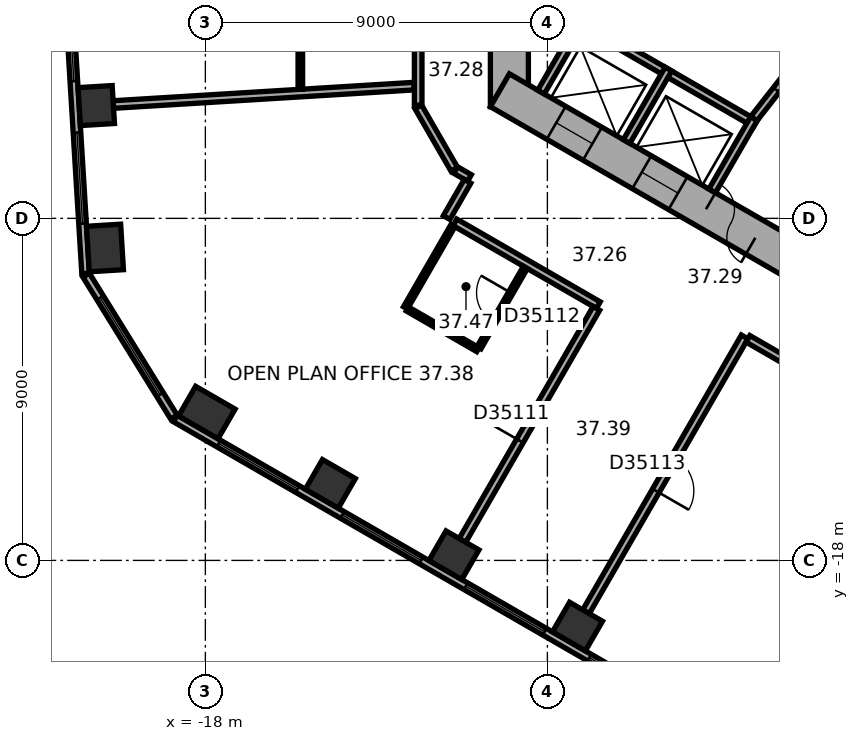
"""IFC4 building model, lengths in metres.
Left out: names, types, materials, properties, quantities, classifications, styles, units other than length and angle.
Written with IfcOpenShell. Run it as: python <this file> out.ifc"""

import sys

from ifc_helpers import new_model, si_unit, direction, frame, frame_2d, origin, origin_2d, place, context, subcontext, project, spatial, rectangle, extrude, element, fill, save


model = new_model("IFC4")
c1 = context("Model", 3, precision=1e-05, world=origin(), true_north=direction((0.0, 1.0)))
c2 = subcontext(c1, "Body", "Model", "MODEL_VIEW")
j1 = project(units=[si_unit("LENGTHUNIT", "METRE"), si_unit("PLANEANGLEUNIT", "RADIAN")], contexts=[c1])
p1 = place(None, origin())
s1 = spatial("IfcSite", under=j1, at=p1, CompositionType="ELEMENT")
p2 = place(p1, origin())
s2 = spatial("IfcBuilding", under=s1, at=p2, CompositionType="ELEMENT")
p3 = place(p2, frame((0.0, 0.0, 154.0)))
s3 = spatial("IfcBuildingStorey", under=s2, at=p3, CompositionType="ELEMENT", Elevation=154.0)
p4 = place(p3, frame((-20.871, -6.032, 0.0), z_axis=(0.0, 0.0, 1.0), x_axis=(0.061048539535, -0.998134798422, 0.0)))
e1 = element("IfcColumn", 1, at=p4, inside=s3, PredefinedType="COLUMN", context=c2, shape_type="SweptSolid", body=[
    extrude(rectangle(XDim=1.0, YDim=0.9, at=origin_2d()), origin(), (0.0, 0.0, 1.0), 3.7),
])
for number, where, z_axis, x_axis in (
    (2, (-20.642, -9.779, 0.0), (0.0, 0.0, 1.0), (0.061, -0.998, 0.0)),
    (3, (-17.962, -14.109, 0.0), (0.0, 0.0, 1.0), (0.866, -0.5, 0.0)),
):
    element("IfcColumn", number, at=place(p3, frame(where, z_axis=z_axis, x_axis=x_axis)), inside=s3, PredefinedType="COLUMN", context=c2, shape_type="SweptSolid", body=[
        extrude(rectangle(XDim=1.2, YDim=0.9, at=origin_2d()), origin(), (0.0, 0.0, 1.0), 3.7),
    ])
for number, where, z_axis, x_axis in (
    (4, (-14.711, -15.986, 0.0), (0.0, 0.0, 1.0), (0.866, -0.5, 0.0)),
    (5, (-11.46, -17.863, 0.0), (0.0, 0.0, 1.0), (0.866, -0.5, 0.0)),
    (6, (-8.208, -19.74, 0.0), (0.0, 0.0, 1.0), (0.866, -0.5, 0.0)),
):
    element("IfcColumn", number, at=place(p3, frame(where, z_axis=z_axis, x_axis=x_axis)), inside=s3, PredefinedType="COLUMN", context=c2, shape_type="SweptSolid", body=[
        extrude(rectangle(XDim=1.0, YDim=0.9, at=origin_2d()), origin(), (0.0, 0.0, 1.0), 3.7),
    ])
p5 = place(p3, frame((-10.0, 6.062, 0.0), z_axis=(0.0, 0.0, 1.0), x_axis=(0.0, -1.0, 0.0)))
e7 = element("IfcWall", 7, at=p5, inside=s3, PredefinedType="SHEAR", context=c2, shape_type="SweptSolid", body=[
    extrude(rectangle(XDim=12.125, YDim=1.0, at=frame_2d((6.062, 0.0))), origin(), (0.0, 0.0, 1.0), 3.7),
])
p6 = place(p5, frame((5.212, 0.0, 0.0)))
e8 = element("IfcOpeningElement", 8, at=p6, cuts=e7, PredefinedType="OPENING", context=c2, shape_type="SweptSolid", body=[
    extrude(rectangle(XDim=1.1, YDim=2.1, at=frame_2d((0.55, 1.05))), frame((0.0, 0.51, 0.0), z_axis=(0.0, -1.0, 0.0), x_axis=(1.0, 0.0, 0.0)), (0.0, 0.0, 1.0), 1.02),
])
p7 = place(p5, frame((7.812, 0.0, 0.0)))
e9 = element("IfcOpeningElement", 9, at=p7, cuts=e7, PredefinedType="OPENING", context=c2, shape_type="SweptSolid", body=[
    extrude(rectangle(XDim=1.1, YDim=2.1, at=frame_2d((0.55, 1.05))), frame((0.0, 0.51, 0.0), z_axis=(0.0, -1.0, 0.0), x_axis=(1.0, 0.0, 0.0)), (0.0, 0.0, 1.0), 1.02),
])
p8 = place(p3, frame((-10.25, -5.629, 0.0), z_axis=(0.0, 0.0, 1.0), x_axis=(0.866022616891, -0.50000482701, 0.0)))
e10 = element("IfcWall", 10, at=p8, inside=s3, PredefinedType="SHEAR", context=c2, shape_type="SweptSolid", body=[
    extrude(rectangle(XDim=12.125, YDim=1.0, at=frame_2d((6.062, 0.0))), origin(), (0.0, 0.0, 1.0), 3.7),
])
p9 = place(p8, frame((6.262, 0.0, 0.0)))
e11 = element("IfcOpeningElement", 11, at=p9, cuts=e10, PredefinedType="OPENING", context=c2, shape_type="SweptSolid", body=[
    extrude(rectangle(XDim=1.5, YDim=2.1, at=frame_2d((0.75, 1.05))), frame((0.0, 0.51, 0.0), z_axis=(0.0, -1.0, 0.0), x_axis=(1.0, 0.0, 0.0)), (0.0, 0.0, 1.0), 1.02),
])
p10 = place(p8, frame((1.712, 0.0, 0.0)))
e12 = element("IfcOpeningElement", 12, at=p10, cuts=e10, PredefinedType="OPENING", context=c2, shape_type="SweptSolid", body=[
    extrude(rectangle(XDim=1.1, YDim=2.1, at=frame_2d((0.55, 1.05))), frame((0.0, 0.51, 0.0), z_axis=(0.0, -1.0, 0.0), x_axis=(1.0, 0.0, 0.0)), (0.0, 0.0, 1.0), 1.02),
])
p11 = place(p8, frame((4.312, 0.0, 0.0)))
e13 = element("IfcOpeningElement", 13, at=p11, cuts=e10, PredefinedType="OPENING", context=c2, shape_type="SweptSolid", body=[
    extrude(rectangle(XDim=1.1, YDim=2.1, at=frame_2d((0.55, 1.05))), frame((0.0, 0.51, 0.0), z_axis=(0.0, -1.0, 0.0), x_axis=(1.0, 0.0, 0.0)), (0.0, 0.0, 1.0), 1.02),
])
p12 = place(p3, frame((-22.375, 9.557, 0.0), z_axis=(0.0, 0.0, 1.0), x_axis=(0.061036015339, -0.998135564356, 0.0)))
e14 = element("IfcWall", 14, at=p12, inside=s3, PredefinedType="STANDARD", context=c2, shape_type="SweptSolid", body=[
    extrude(rectangle(XDim=20.044, YDim=0.2, at=frame_2d((10.022, 0.0))), origin(), (0.0, 0.0, 1.0), 3.7),
])
p13 = place(p12, frame((1.313, 0.0, 0.9)))
e15 = element("IfcOpeningElement", 15, at=p13, cuts=e14, PredefinedType="OPENING", context=c2, shape_type="SweptSolid", body=[
    extrude(rectangle(XDim=2.4, YDim=2.0, at=frame_2d((1.2, 1.0))), frame((0.0, 0.11, 0.0), z_axis=(0.0, -1.0, 0.0), x_axis=(1.0, 0.0, 0.0)), (0.0, 0.0, 1.0), 0.22),
])
p14 = place(p12, frame((5.067, 0.0, 0.9)))
e16 = element("IfcOpeningElement", 16, at=p14, cuts=e14, PredefinedType="OPENING", context=c2, shape_type="SweptSolid", body=[
    extrude(rectangle(XDim=2.4, YDim=2.0, at=frame_2d((1.2, 1.0))), frame((0.0, 0.11, 0.0), z_axis=(0.0, -1.0, 0.0), x_axis=(1.0, 0.0, 0.0)), (0.0, 0.0, 1.0), 0.22),
])
p15 = place(p12, frame((8.821, 0.0, 0.9)))
e17 = element("IfcOpeningElement", 17, at=p15, cuts=e14, PredefinedType="OPENING", context=c2, shape_type="SweptSolid", body=[
    extrude(rectangle(XDim=2.4, YDim=2.0, at=frame_2d((1.2, 1.0))), frame((0.0, 0.11, 0.0), z_axis=(0.0, -1.0, 0.0), x_axis=(1.0, 0.0, 0.0)), (0.0, 0.0, 1.0), 0.22),
])
p16 = place(p12, frame((12.575, 0.0, 0.9)))
e18 = element("IfcOpeningElement", 18, at=p16, cuts=e14, PredefinedType="OPENING", context=c2, shape_type="SweptSolid", body=[
    extrude(rectangle(XDim=2.4, YDim=2.0, at=frame_2d((1.2, 1.0))), frame((0.0, 0.11, 0.0), z_axis=(0.0, -1.0, 0.0), x_axis=(1.0, 0.0, 0.0)), (0.0, 0.0, 1.0), 0.22),
])
p17 = place(p12, frame((16.329, 0.0, 0.9)))
e19 = element("IfcOpeningElement", 19, at=p17, cuts=e14, PredefinedType="OPENING", context=c2, shape_type="SweptSolid", body=[
    extrude(rectangle(XDim=2.4, YDim=2.0, at=frame_2d((1.2, 1.0))), frame((0.0, 0.11, 0.0), z_axis=(0.0, -1.0, 0.0), x_axis=(1.0, 0.0, 0.0)), (0.0, 0.0, 1.0), 0.22),
])
p18 = place(p3, frame((-21.137, -10.496, 0.0), z_axis=(0.0, 0.0, 1.0), x_axis=(0.526178661629, -0.850374044786, 0.0)))
e20 = element("IfcWall", 20, at=p18, inside=s3, PredefinedType="STANDARD", context=c2, shape_type="SweptSolid", body=[
    extrude(rectangle(XDim=4.395, YDim=0.2, at=frame_2d((2.197, 0.0))), origin(), (0.0, 0.0, 1.0), 3.7),
])
p19 = place(p18, frame((0.698, 0.0, 0.9)))
e21 = element("IfcOpeningElement", 21, at=p19, cuts=e20, PredefinedType="OPENING", context=c2, shape_type="SweptSolid", body=[
    extrude(rectangle(XDim=3.0, YDim=2.0, at=frame_2d((1.5, 1.0))), frame((0.0, 0.11, 0.0), z_axis=(0.0, -1.0, 0.0), x_axis=(1.0, 0.0, 0.0)), (0.0, 0.0, 1.0), 0.22),
])
p20 = place(p3, frame((-18.789, -14.267, 0.0), z_axis=(0.0, 0.0, 1.0), x_axis=(0.866023315909, -0.500003616288, 0.0)))
e22 = element("IfcWall", 22, at=p20, inside=s3, PredefinedType="STANDARD", context=c2, shape_type="SweptSolid", body=[
    extrude(rectangle(XDim=20.044, YDim=0.2, at=frame_2d((10.022, 0.0))), origin(), (0.0, 0.0, 1.0), 3.7),
])
p21 = place(p20, frame((1.314, 0.0, 0.9)))
e23 = element("IfcOpeningElement", 23, at=p21, cuts=e22, PredefinedType="OPENING", context=c2, shape_type="SweptSolid", body=[
    extrude(rectangle(XDim=2.4, YDim=2.0, at=frame_2d((1.2, 1.0))), frame((0.0, 0.11, 0.0), z_axis=(0.0, -1.0, 0.0), x_axis=(1.0, 0.0, 0.0)), (0.0, 0.0, 1.0), 0.22),
])
p22 = place(p20, frame((5.069, 0.0, 0.9)))
e24 = element("IfcOpeningElement", 24, at=p22, cuts=e22, PredefinedType="OPENING", context=c2, shape_type="SweptSolid", body=[
    extrude(rectangle(XDim=2.4, YDim=2.0, at=frame_2d((1.2, 1.0))), frame((0.0, 0.11, 0.0), z_axis=(0.0, -1.0, 0.0), x_axis=(1.0, 0.0, 0.0)), (0.0, 0.0, 1.0), 0.22),
])
p23 = place(p20, frame((8.823, 0.0, 0.9)))
e25 = element("IfcOpeningElement", 25, at=p23, cuts=e22, PredefinedType="OPENING", context=c2, shape_type="SweptSolid", body=[
    extrude(rectangle(XDim=2.4, YDim=2.0, at=frame_2d((1.2, 1.0))), frame((0.0, 0.11, 0.0), z_axis=(0.0, -1.0, 0.0), x_axis=(1.0, 0.0, 0.0)), (0.0, 0.0, 1.0), 0.22),
])
p24 = place(p20, frame((12.577, 0.0, 0.9)))
e26 = element("IfcOpeningElement", 26, at=p24, cuts=e22, PredefinedType="OPENING", context=c2, shape_type="SweptSolid", body=[
    extrude(rectangle(XDim=2.4, YDim=2.0, at=frame_2d((1.2, 1.0))), frame((0.0, 0.11, 0.0), z_axis=(0.0, -1.0, 0.0), x_axis=(1.0, 0.0, 0.0)), (0.0, 0.0, 1.0), 0.22),
])
p25 = place(p20, frame((16.331, 0.0, 0.9)))
e27 = element("IfcOpeningElement", 27, at=p25, cuts=e22, PredefinedType="OPENING", context=c2, shape_type="SweptSolid", body=[
    extrude(rectangle(XDim=2.4, YDim=2.0, at=frame_2d((1.2, 1.0))), frame((0.0, 0.11, 0.0), z_axis=(0.0, -1.0, 0.0), x_axis=(1.0, 0.0, 0.0)), (0.0, 0.0, 1.0), 0.22),
])
p26 = place(p3, frame((-8.203, -3.809, 0.0), z_axis=(0.0, 0.0, 1.0), x_axis=(0.866028230842, -0.499995103361, 0.0)))
e28 = element("IfcWall", 28, at=p26, inside=s3, PredefinedType="PARTITIONING", context=c2, shape_type="SweptSolid", body=[
    extrude(rectangle(XDim=5.4, YDim=0.2, at=frame_2d((2.7, 0.0))), origin(), (0.0, 0.0, 1.0), 3.42),
])
for number, where, z_axis, x_axis in (
    (29, (-8.067, -3.772, 0.0), (0.0, 0.0, 1.0), (-0.5, -0.866, 0.0)),
    (30, (-5.815, -5.072, 0.0), (0.0, 0.0, 1.0), (-0.5, -0.866, 0.0)),
):
    element("IfcWall", number, at=place(p3, frame(where, z_axis=z_axis, x_axis=x_axis)), inside=s3, PredefinedType="PARTITIONING", context=c2, shape_type="SweptSolid", body=[
        extrude(rectangle(XDim=2.2, YDim=0.2, at=frame_2d((1.1, 0.0))), origin(), (0.0, 0.0, 1.0), 3.42),
    ])
p27 = place(p3, frame((-3.563, -6.372, 0.0), z_axis=(0.0, 0.0, 1.0), x_axis=(-0.499994660107, -0.866028486751, 0.0)))
e31 = element("IfcWall", 31, at=p27, inside=s3, PredefinedType="PARTITIONING", context=c2, shape_type="SweptSolid", body=[
    extrude(rectangle(XDim=2.2, YDim=0.2, at=frame_2d((1.1, 0.0))), origin(), (0.0, 0.0, 1.0), 3.42),
])
p28 = place(p3, frame((-1.712, -4.008, 0.0), z_axis=(0.0, 0.0, 1.0), x_axis=(-0.616549420702, -0.787316208287, 0.0)))
e32 = element("IfcWall", 32, at=p28, inside=s3, PredefinedType="PARTITIONING", context=c2, shape_type="SweptSolid", body=[
    extrude(rectangle(XDim=3.002, YDim=0.2, at=frame_2d((1.501, 0.0))), origin(), (0.0, 0.0, 1.0), 3.42),
])
p29 = place(p28, frame((1.15, 0.0, 0.0)))
e33 = element("IfcOpeningElement", 33, at=p29, cuts=e32, PredefinedType="OPENING", context=c2, shape_type="SweptSolid", body=[
    extrude(rectangle(XDim=0.9, YDim=2.1, at=frame_2d((0.45, 1.05))), frame((0.0, 0.11, 0.0), z_axis=(0.0, -1.0, 0.0), x_axis=(1.0, 0.0, 0.0)), (0.0, 0.0, 1.0), 0.22),
])
p30 = place(p3, frame((-20.421, -6.005, 0.0), z_axis=(0.0, 0.0, 1.0), x_axis=(0.998134865741, 0.061047438866, 0.0)))
e34 = element("IfcWall", 34, at=p30, inside=s3, PredefinedType="PARTITIONING", context=c2, shape_type="SweptSolid", body=[
    extrude(rectangle(XDim=7.927, YDim=0.2, at=frame_2d((3.963, 0.0))), origin(), (0.0, 0.0, 1.0), 2.87),
])
p31 = place(p3, frame((-15.501, 5.479, 0.0), z_axis=(0.0, 0.0, 1.0), x_axis=(0.0, -1.0, 0.0)))
e35 = element("IfcWall", 35, at=p31, inside=s3, PredefinedType="PARTITIONING", context=c2, shape_type="SweptSolid", body=[
    extrude(rectangle(XDim=11.083, YDim=0.12, at=frame_2d((5.542, 0.0))), origin(), (0.0, 0.0, 1.0), 3.42),
])
p32 = place(p31, frame((0.55, 0.0, 0.0)))
e36 = element("IfcOpeningElement", 36, at=p32, cuts=e35, PredefinedType="OPENING", context=c2, shape_type="SweptSolid", body=[
    extrude(rectangle(XDim=1.0, YDim=2.1, at=frame_2d((0.5, 1.05))), frame((0.0, 0.07, 0.0), z_axis=(0.0, -1.0, 0.0), x_axis=(1.0, 0.0, 0.0)), (0.0, 0.0, 1.0), 0.14),
])
p33 = place(p31, frame((3.636, 0.0, 0.0)))
e37 = element("IfcOpeningElement", 37, at=p33, cuts=e35, PredefinedType="OPENING", context=c2, shape_type="SweptSolid", body=[
    extrude(rectangle(XDim=0.9, YDim=2.1, at=frame_2d((0.45, 1.05))), frame((0.0, 0.07, 0.0), z_axis=(0.0, -1.0, 0.0), x_axis=(1.0, 0.0, 0.0)), (0.0, 0.0, 1.0), 0.14),
])
p34 = place(p31, frame((8.127, 0.0, 0.0)))
e38 = element("IfcOpeningElement", 38, at=p34, cuts=e35, PredefinedType="OPENING", context=c2, shape_type="SweptSolid", body=[
    extrude(rectangle(XDim=0.9, YDim=2.1, at=frame_2d((0.45, 1.05))), frame((0.0, 0.07, 0.0), z_axis=(0.0, -1.0, 0.0), x_axis=(1.0, 0.0, 0.0)), (0.0, 0.0, 1.0), 0.14),
])
p35 = place(p3, frame((-12.735, -11.355, 0.0), z_axis=(0.0, 0.0, 1.0), x_axis=(0.500004234368, 0.866022959057, 0.0)))
e39 = element("IfcWall", 39, at=p35, inside=s3, PredefinedType="PARTITIONING", context=c2, shape_type="SweptSolid", body=[
    extrude(rectangle(XDim=2.5, YDim=0.12, at=frame_2d((1.25, 0.0))), origin(), (0.0, 0.0, 1.0), 3.42),
])
p36 = place(p3, frame((-12.4, -6.062, 0.0), z_axis=(0.0, 0.0, 1.0), x_axis=(0.500022797313, -0.86601224135, 0.0)))
e40 = element("IfcWall", 40, at=p36, inside=s3, PredefinedType="PARTITIONING", context=c2, shape_type="SweptSolid", body=[
    extrude(rectangle(XDim=1.9, YDim=0.2, at=frame_2d((0.95, 0.0))), origin(), (0.0, 0.0, 1.0), 3.42),
])
p37 = place(p3, frame((-12.4, -4.201, 0.0), z_axis=(0.0, 0.0, 1.0), x_axis=(0.0, -1.0, 0.0)))
e41 = element("IfcWall", 41, at=p37, inside=s3, PredefinedType="PARTITIONING", context=c2, shape_type="SweptSolid", body=[
    extrude(rectangle(XDim=1.821, YDim=0.2, at=frame_2d((0.911, 0.0))), origin(), (0.0, 0.0, 1.0), 3.42),
])
p38 = place(p3, frame((-11.435, -9.103, 0.0), z_axis=(0.0, 0.0, 1.0), x_axis=(0.866007399799, -0.500031182522, 0.0)))
e42 = element("IfcWall", 42, at=p38, inside=s3, PredefinedType="PARTITIONING", context=c2, shape_type="SweptSolid", body=[
    extrude(rectangle(XDim=4.358, YDim=0.2, at=frame_2d((2.179, 0.0))), origin(), (0.0, 0.0, 1.0), 3.42),
])
p39 = place(p3, frame((-11.415, -7.728, 0.0), z_axis=(0.0, 0.0, 1.0), x_axis=(0.865915281873, -0.500190688257, 0.0)))
e43 = element("IfcWall", 43, at=p39, inside=s3, PredefinedType="PARTITIONING", context=c2, shape_type="SweptSolid", body=[
    extrude(rectangle(XDim=0.421, YDim=0.2, at=frame_2d((0.21, 0.0))), origin(), (0.0, 0.0, 1.0), 3.42),
])
p40 = place(p3, frame((-11.235, -17.474, 0.0), z_axis=(0.0, 0.0, 1.0), x_axis=(0.500009260695, 0.866020057054, 0.0)))
e44 = element("IfcWall", 44, at=p40, inside=s3, PredefinedType="PARTITIONING", context=c2, shape_type="SweptSolid", body=[
    extrude(rectangle(XDim=7.049, YDim=0.2, at=frame_2d((3.524, 0.0))), origin(), (0.0, 0.0, 1.0), 2.87),
])
p41 = place(p40, frame((3.024, 0.0, 0.0)))
e45 = element("IfcOpeningElement", 45, at=p41, cuts=e44, PredefinedType="OPENING", context=c2, shape_type="SweptSolid", body=[
    extrude(rectangle(XDim=1.0, YDim=2.1, at=frame_2d((0.5, 1.05))), frame((0.0, 0.11, 0.0), z_axis=(0.0, -1.0, 0.0), x_axis=(1.0, 0.0, 0.0)), (0.0, 0.0, 1.0), 0.22),
])
p42 = place(p3, frame((-11.101, -8.025, 0.0), z_axis=(0.0, 0.0, 1.0), x_axis=(-0.500074377092, -0.865982457891, 0.0)))
e46 = element("IfcWall", 46, at=p42, inside=s3, PredefinedType="PARTITIONING", context=c2, shape_type="SweptSolid", body=[
    extrude(rectangle(XDim=1.101, YDim=0.2, at=frame_2d((0.55, 0.0))), origin(), (0.0, 0.0, 1.0), 3.42),
])
p43 = place(p3, frame((-10.829, -12.455, 0.0), z_axis=(0.0, 0.0, 1.0), x_axis=(-0.86600889856, 0.500028586798, 0.0)))
e47 = element("IfcWall", 47, at=p43, inside=s3, PredefinedType="PARTITIONING", context=c2, shape_type="SweptSolid", body=[
    extrude(rectangle(XDim=2.14, YDim=0.12, at=frame_2d((1.07, 0.0))), origin(), (0.0, 0.0, 1.0), 3.42),
])
p44 = place(p3, frame((-9.579, -10.29, 0.0), z_axis=(0.0, 0.0, 1.0), x_axis=(-0.499959183527, -0.866048967903, 0.0)))
e48 = element("IfcWall", 48, at=p44, inside=s3, PredefinedType="PARTITIONING", context=c2, shape_type="SweptSolid", body=[
    extrude(rectangle(XDim=2.44, YDim=0.12, at=frame_2d((1.22, 0.0))), origin(), (0.0, 0.0, 1.0), 3.42),
])
p45 = place(p44, frame((0.77, 0.0, 0.0)))
e49 = element("IfcOpeningElement", 49, at=p45, cuts=e48, PredefinedType="OPENING", context=c2, shape_type="SweptSolid", body=[
    extrude(rectangle(XDim=0.9, YDim=2.1, at=frame_2d((0.45, 1.05))), frame((0.0, 0.07, 0.0), z_axis=(0.0, -1.0, 0.0), x_axis=(1.0, 0.0, 0.0)), (0.0, 0.0, 1.0), 0.14),
])
p46 = place(p3, frame((-7.984, -19.351, 0.0), z_axis=(0.0, 0.0, 1.0), x_axis=(0.500010139422, 0.866019549707, 0.0)))
e50 = element("IfcWall", 50, at=p46, inside=s3, PredefinedType="PARTITIONING", context=c2, shape_type="SweptSolid", body=[
    extrude(rectangle(XDim=8.35, YDim=0.2, at=frame_2d((4.175, 0.0))), origin(), (0.0, 0.0, 1.0), 3.42),
])
p47 = place(p46, frame((3.675, 0.0, 0.0)))
e51 = element("IfcOpeningElement", 51, at=p47, cuts=e50, PredefinedType="OPENING", context=c2, shape_type="SweptSolid", body=[
    extrude(rectangle(XDim=1.0, YDim=2.1, at=frame_2d((0.5, 1.05))), frame((0.0, 0.11, 0.0), z_axis=(0.0, -1.0, 0.0), x_axis=(1.0, 0.0, 0.0)), (0.0, 0.0, 1.0), 0.22),
])
p48 = place(p3, frame((-3.722, -12.169, 0.0), z_axis=(0.0, 0.0, 1.0), x_axis=(0.866033163891, -0.499986558861, 0.0)))
e52 = element("IfcWall", 52, at=p48, inside=s3, PredefinedType="PARTITIONING", context=c2, shape_type="SweptSolid", body=[
    extrude(rectangle(XDim=3.201, YDim=0.2, at=frame_2d((1.6, 0.0))), origin(), (0.0, 0.0, 1.0), 3.42),
])
p49 = place(p16, origin())
e53 = element("IfcWindow", 53, at=p49, inside=s3, PartitioningType="SINGLE_PANEL", PredefinedType="WINDOW", context=c2, shape_type="SweptSolid", body=[
    extrude(rectangle(XDim=2.4, YDim=2.0, at=frame_2d((1.2, 1.0))), frame((0.0, 0.03, 0.0), z_axis=(0.0, -1.0, 0.0), x_axis=(1.0, 0.0, 0.0)), (0.0, 0.0, 1.0), 0.06),
])
fill(e18, e53)
p50 = place(p17, origin())
e54 = element("IfcWindow", 54, at=p50, inside=s3, PartitioningType="SINGLE_PANEL", PredefinedType="WINDOW", context=c2, shape_type="SweptSolid", body=[
    extrude(rectangle(XDim=2.4, YDim=2.0, at=frame_2d((1.2, 1.0))), frame((0.0, 0.03, 0.0), z_axis=(0.0, -1.0, 0.0), x_axis=(1.0, 0.0, 0.0)), (0.0, 0.0, 1.0), 0.06),
])
fill(e19, e54)
p51 = place(p19, origin())
e55 = element("IfcWindow", 55, at=p51, inside=s3, PartitioningType="SINGLE_PANEL", PredefinedType="WINDOW", context=c2, shape_type="SweptSolid", body=[
    extrude(rectangle(XDim=3.0, YDim=2.0, at=frame_2d((1.5, 1.0))), frame((0.0, 0.03, 0.0), z_axis=(0.0, -1.0, 0.0), x_axis=(1.0, 0.0, 0.0)), (0.0, 0.0, 1.0), 0.06),
])
fill(e21, e55)
p52 = place(p21, origin())
e56 = element("IfcWindow", 56, at=p52, inside=s3, PartitioningType="SINGLE_PANEL", PredefinedType="WINDOW", context=c2, shape_type="SweptSolid", body=[
    extrude(rectangle(XDim=2.4, YDim=2.0, at=frame_2d((1.2, 1.0))), frame((0.0, 0.03, 0.0), z_axis=(0.0, -1.0, 0.0), x_axis=(1.0, 0.0, 0.0)), (0.0, 0.0, 1.0), 0.06),
])
fill(e23, e56)
p53 = place(p22, origin())
e57 = element("IfcWindow", 57, at=p53, inside=s3, PartitioningType="SINGLE_PANEL", PredefinedType="WINDOW", context=c2, shape_type="SweptSolid", body=[
    extrude(rectangle(XDim=2.4, YDim=2.0, at=frame_2d((1.2, 1.0))), frame((0.0, 0.03, 0.0), z_axis=(0.0, -1.0, 0.0), x_axis=(1.0, 0.0, 0.0)), (0.0, 0.0, 1.0), 0.06),
])
fill(e24, e57)
p54 = place(p23, origin())
e58 = element("IfcWindow", 58, at=p54, inside=s3, PartitioningType="SINGLE_PANEL", PredefinedType="WINDOW", context=c2, shape_type="SweptSolid", body=[
    extrude(rectangle(XDim=2.4, YDim=2.0, at=frame_2d((1.2, 1.0))), frame((0.0, 0.03, 0.0), z_axis=(0.0, -1.0, 0.0), x_axis=(1.0, 0.0, 0.0)), (0.0, 0.0, 1.0), 0.06),
])
fill(e25, e58)
p55 = place(p24, origin())
e59 = element("IfcWindow", 59, at=p55, inside=s3, PartitioningType="SINGLE_PANEL", PredefinedType="WINDOW", context=c2, shape_type="SweptSolid", body=[
    extrude(rectangle(XDim=2.4, YDim=2.0, at=frame_2d((1.2, 1.0))), frame((0.0, 0.03, 0.0), z_axis=(0.0, -1.0, 0.0), x_axis=(1.0, 0.0, 0.0)), (0.0, 0.0, 1.0), 0.06),
])
fill(e26, e59)
p56 = place(p9, origin())
e60 = element("IfcDoor", 60, at=p56, inside=s3, OperationType="DOUBLE_DOOR_SINGLE_SWING", PredefinedType="DOOR", context=c2, shape_type="SweptSolid", body=[
    extrude(rectangle(XDim=1.5, YDim=2.1, at=frame_2d((0.75, 1.05))), frame((0.0, 0.025, 0.0), z_axis=(0.0, -1.0, 0.0), x_axis=(1.0, 0.0, 0.0)), (0.0, 0.0, 1.0), 0.05),
])
fill(e11, e60)
p57 = place(p29, origin())
e61 = element("IfcDoor", 61, at=p57, inside=s3, OperationType="SINGLE_SWING_LEFT", PredefinedType="DOOR", context=c2, shape_type="SweptSolid", body=[
    extrude(rectangle(XDim=0.9, YDim=2.1, at=frame_2d((0.45, 1.05))), frame((0.0, 0.025, 0.0), z_axis=(0.0, -1.0, 0.0), x_axis=(1.0, 0.0, 0.0)), (0.0, 0.0, 1.0), 0.05),
])
fill(e33, e61)
p58 = place(p10, origin())
e62 = element("IfcDoor", 62, at=p58, inside=s3, OperationType="DOUBLE_DOOR_SLIDING", PredefinedType="DOOR", context=c2, shape_type="SweptSolid", body=[
    extrude(rectangle(XDim=1.1, YDim=2.1, at=frame_2d((0.55, 1.05))), frame((0.0, 0.025, 0.0), z_axis=(0.0, -1.0, 0.0), x_axis=(1.0, 0.0, 0.0)), (0.0, 0.0, 1.0), 0.05),
])
fill(e12, e62)
p59 = place(p11, origin())
e63 = element("IfcDoor", 63, at=p59, inside=s3, OperationType="DOUBLE_DOOR_SLIDING", PredefinedType="DOOR", context=c2, shape_type="SweptSolid", body=[
    extrude(rectangle(XDim=1.1, YDim=2.1, at=frame_2d((0.55, 1.05))), frame((0.0, 0.025, 0.0), z_axis=(0.0, -1.0, 0.0), x_axis=(1.0, 0.0, 0.0)), (0.0, 0.0, 1.0), 0.05),
])
fill(e13, e63)
p60 = place(p41, origin())
e64 = element("IfcDoor", 64, at=p60, inside=s3, OperationType="SINGLE_SWING_LEFT", PredefinedType="DOOR", context=c2, shape_type="SweptSolid", body=[
    extrude(rectangle(XDim=1.0, YDim=2.1, at=frame_2d((0.5, 1.05))), frame((0.0, 0.025, 0.0), z_axis=(0.0, -1.0, 0.0), x_axis=(1.0, 0.0, 0.0)), (0.0, 0.0, 1.0), 0.05),
])
fill(e45, e64)
p61 = place(p45, origin())
e65 = element("IfcDoor", 65, at=p61, inside=s3, OperationType="SINGLE_SWING_LEFT", PredefinedType="DOOR", context=c2, shape_type="SweptSolid", body=[
    extrude(rectangle(XDim=0.9, YDim=2.1, at=frame_2d((0.45, 1.05))), frame((0.0, 0.025, 0.0), z_axis=(0.0, -1.0, 0.0), x_axis=(1.0, 0.0, 0.0)), (0.0, 0.0, 1.0), 0.05),
])
fill(e49, e65)
p62 = place(p47, origin())
e66 = element("IfcDoor", 66, at=p62, inside=s3, OperationType="SINGLE_SWING_LEFT", PredefinedType="DOOR", context=c2, shape_type="SweptSolid", body=[
    extrude(rectangle(XDim=1.0, YDim=2.1, at=frame_2d((0.5, 1.05))), frame((0.0, 0.025, 0.0), z_axis=(0.0, -1.0, 0.0), x_axis=(1.0, 0.0, 0.0)), (0.0, 0.0, 1.0), 0.05),
])
fill(e51, e66)
save(model, sys.argv[1])
